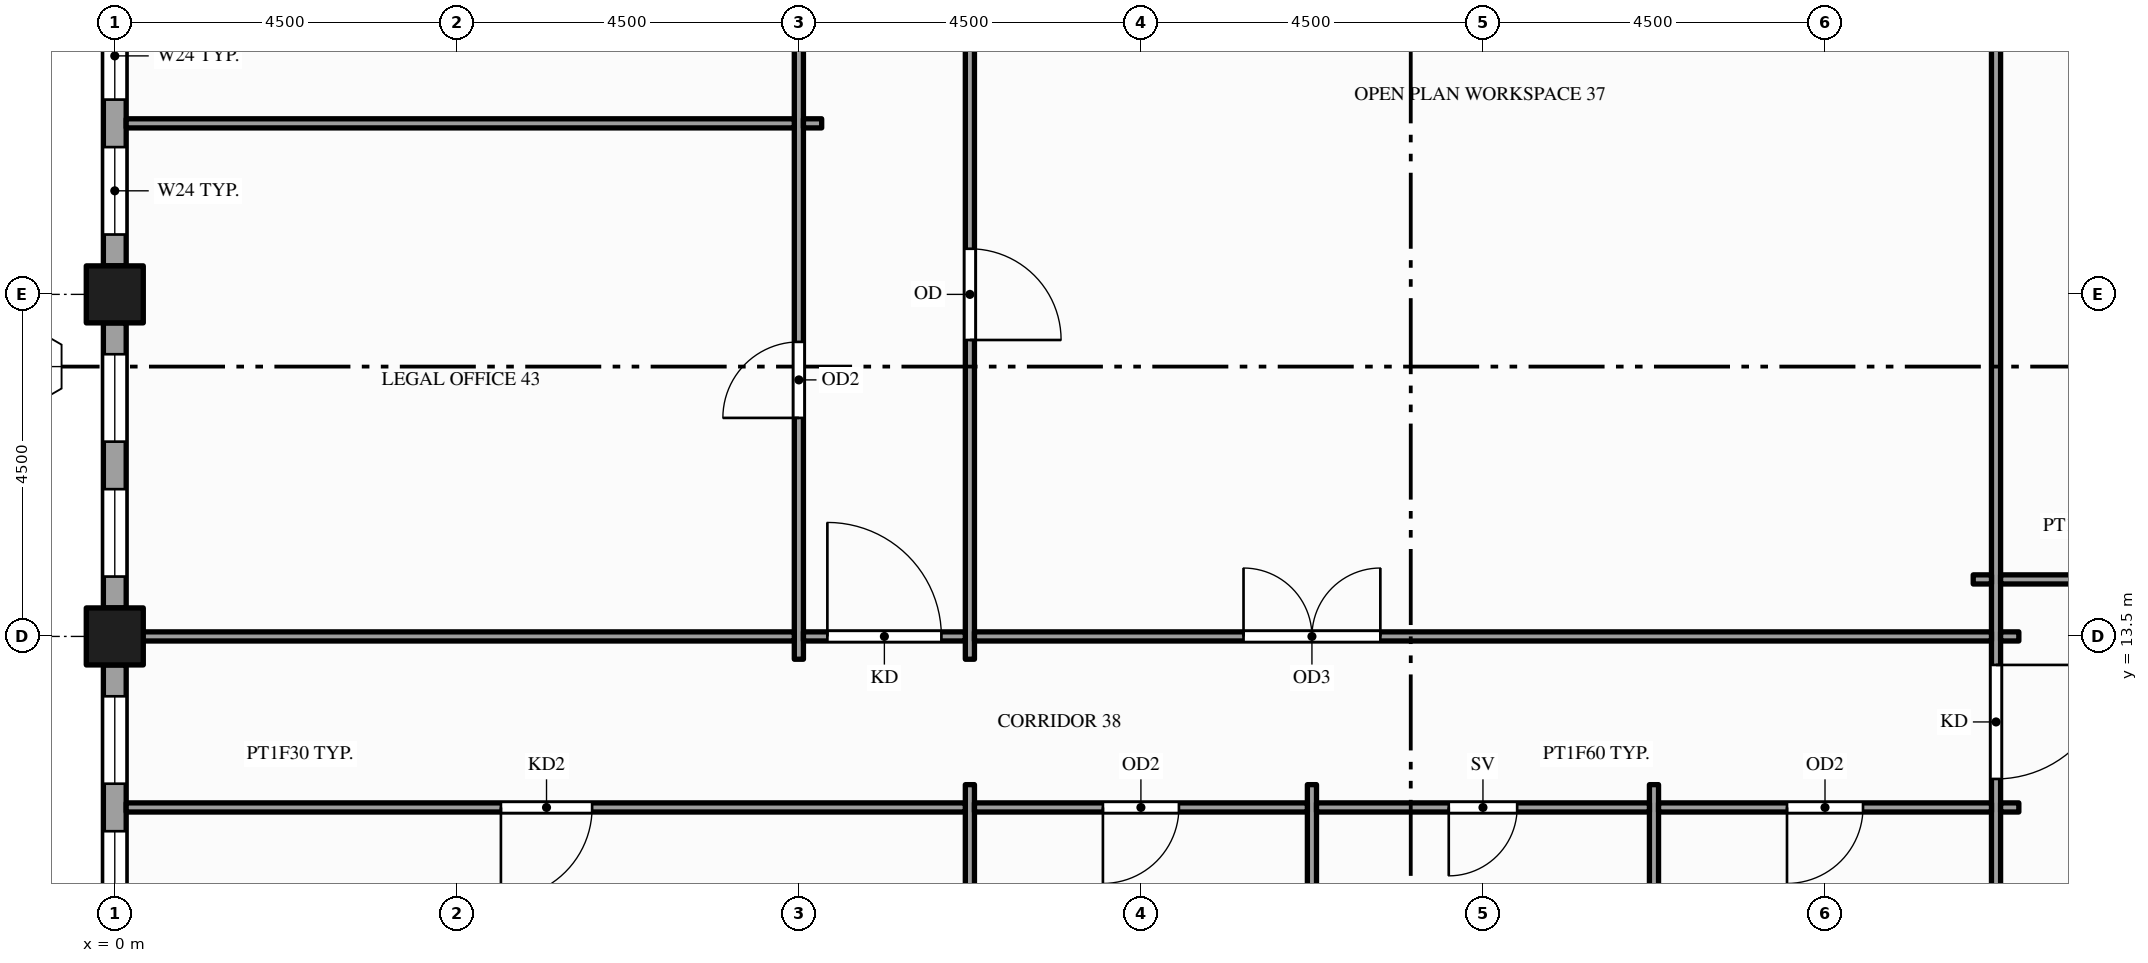
"""IFC4 building model, lengths in metres.
Left out: names, types, materials, properties, quantities, classifications, styles, units other than length and angle.
Written with IfcOpenShell. Run it as: python <this file> out.ifc"""

import sys

from ifc_helpers import new_model, si_unit, direction, frame, frame_2d, origin, origin_2d, place, context, subcontext, project, spatial, rectangle, hollow_rectangle, extrude, element, fill, save


model = new_model("IFC4")
c1 = context("Model", 3, precision=1e-05, world=origin(), true_north=direction((0.0, 1.0)))
c2 = subcontext(c1, "Body", "Model", "MODEL_VIEW")
j1 = project(units=[si_unit("LENGTHUNIT", "METRE"), si_unit("PLANEANGLEUNIT", "RADIAN")], contexts=[c1])
p1 = place(None, origin())
s1 = spatial("IfcSite", under=j1, at=p1, CompositionType="ELEMENT")
p2 = place(p1, origin())
s2 = spatial("IfcBuilding", under=s1, at=p2, CompositionType="ELEMENT")
p3 = place(p2, frame((0.0, 0.0, 239.0)))
s3 = spatial("IfcBuildingStorey", under=s2, at=p3, CompositionType="ELEMENT", Elevation=239.0)
for number, where, z_axis, x_axis in (
    (1, (0.0, 13.5, -0.15), (0.0, 0.0, 1.0), (1.0, 0.0, 0.0)),
    (2, (0.0, 18.0, -0.15), (0.0, 0.0, 1.0), (1.0, 0.0, 0.0)),
):
    element("IfcColumn", number, at=place(p3, frame(where, z_axis=z_axis, x_axis=x_axis)), inside=s3, PredefinedType="COLUMN", context=c2, shape_type="SweptSolid", body=[
        extrude(hollow_rectangle(XDim=0.75, YDim=0.75, WallThickness=0.036, at=origin_2d()), origin(), (0.0, 0.0, 1.0), 3.9),
    ])
p4 = place(p3, frame((0.0, 22.125, 0.0), z_axis=(0.0, 0.0, 1.0), x_axis=(0.0, -1.0, 0.0)))
e3 = element("IfcWall", 3, at=p4, inside=s3, PredefinedType="STANDARD", context=c2, shape_type="SweptSolid", body=[
    extrude(rectangle(XDim=3.75, YDim=0.3, at=frame_2d((1.875, 0.0))), origin(), (0.0, 0.0, 1.0), 3.057),
])
p5 = place(p4, frame((0.413, 0.0, 0.9)))
e4 = element("IfcOpeningElement", 4, at=p5, cuts=e3, PredefinedType="OPENING", context=c2, shape_type="SweptSolid", body=[
    extrude(rectangle(XDim=1.15, YDim=2.0, at=frame_2d((0.575, 1.0))), frame((0.0, 0.16, 0.0), z_axis=(0.0, -1.0, 0.0), x_axis=(1.0, 0.0, 0.0)), (0.0, 0.0, 1.0), 0.32),
])
p6 = place(p4, frame((2.188, 0.0, 0.9)))
e5 = element("IfcOpeningElement", 5, at=p6, cuts=e3, PredefinedType="OPENING", context=c2, shape_type="SweptSolid", body=[
    extrude(rectangle(XDim=1.15, YDim=2.0, at=frame_2d((0.575, 1.0))), frame((0.0, 0.16, 0.0), z_axis=(0.0, -1.0, 0.0), x_axis=(1.0, 0.0, 0.0)), (0.0, 0.0, 1.0), 0.32),
])
p7 = place(p3, frame((0.0, 17.625, 0.0), z_axis=(0.0, 0.0, 1.0), x_axis=(0.0, -1.0, 0.0)))
e6 = element("IfcWall", 6, at=p7, inside=s3, PredefinedType="STANDARD", context=c2, shape_type="SweptSolid", body=[
    extrude(rectangle(XDim=3.75, YDim=0.3, at=frame_2d((1.875, 0.0))), origin(), (0.0, 0.0, 1.0), 3.057),
])
p8 = place(p7, frame((0.413, 0.0, 0.9)))
e7 = element("IfcOpeningElement", 7, at=p8, cuts=e6, PredefinedType="OPENING", context=c2, shape_type="SweptSolid", body=[
    extrude(rectangle(XDim=1.15, YDim=2.0, at=frame_2d((0.575, 1.0))), frame((0.0, 0.16, 0.0), z_axis=(0.0, -1.0, 0.0), x_axis=(1.0, 0.0, 0.0)), (0.0, 0.0, 1.0), 0.32),
])
p9 = place(p7, frame((2.188, 0.0, 0.9)))
e8 = element("IfcOpeningElement", 8, at=p9, cuts=e6, PredefinedType="OPENING", context=c2, shape_type="SweptSolid", body=[
    extrude(rectangle(XDim=1.15, YDim=2.0, at=frame_2d((0.575, 1.0))), frame((0.0, 0.16, 0.0), z_axis=(0.0, -1.0, 0.0), x_axis=(1.0, 0.0, 0.0)), (0.0, 0.0, 1.0), 0.32),
])
p10 = place(p3, frame((0.0, 13.125, 0.0), z_axis=(0.0, 0.0, 1.0), x_axis=(0.0, -1.0, 0.0)))
e9 = element("IfcWall", 9, at=p10, inside=s3, PredefinedType="STANDARD", context=c2, shape_type="SweptSolid", body=[
    extrude(rectangle(XDim=3.75, YDim=0.3, at=frame_2d((1.875, 0.0))), origin(), (0.0, 0.0, 1.0), 3.057),
])
p11 = place(p10, frame((0.413, 0.0, 0.9)))
e10 = element("IfcOpeningElement", 10, at=p11, cuts=e9, PredefinedType="OPENING", context=c2, shape_type="SweptSolid", body=[
    extrude(rectangle(XDim=1.15, YDim=2.0, at=frame_2d((0.575, 1.0))), frame((0.0, 0.16, 0.0), z_axis=(0.0, -1.0, 0.0), x_axis=(1.0, 0.0, 0.0)), (0.0, 0.0, 1.0), 0.32),
])
p12 = place(p10, frame((2.188, 0.0, 0.9)))
e11 = element("IfcOpeningElement", 11, at=p12, cuts=e9, PredefinedType="OPENING", context=c2, shape_type="SweptSolid", body=[
    extrude(rectangle(XDim=1.15, YDim=2.0, at=frame_2d((0.575, 1.0))), frame((0.0, 0.16, 0.0), z_axis=(0.0, -1.0, 0.0), x_axis=(1.0, 0.0, 0.0)), (0.0, 0.0, 1.0), 0.32),
])
p13 = place(p3, frame((9.0, 13.2, 0.0), z_axis=(0.0, 0.0, 1.0), x_axis=(0.0, 1.0, 0.0)))
e12 = element("IfcWall", 12, at=p13, inside=s3, PredefinedType="PARTITIONING", context=c2, shape_type="SweptSolid", body=[
    extrude(rectangle(XDim=18.6, YDim=0.12, at=frame_2d((9.3, 0.0))), origin(), (0.0, 0.0, 1.0), 2.72),
])
p14 = place(p13, frame((3.175, 0.0, 0.0)))
e13 = element("IfcOpeningElement", 13, at=p14, cuts=e12, PredefinedType="OPENING", context=c2, shape_type="SweptSolid", body=[
    extrude(rectangle(XDim=1.0, YDim=2.1, at=frame_2d((0.5, 1.05))), frame((0.0, 0.07, 0.0), z_axis=(0.0, -1.0, 0.0), x_axis=(1.0, 0.0, 0.0)), (0.0, 0.0, 1.0), 0.14),
])
p15 = place(p13, frame((9.955, 0.0, 0.0)))
e14 = element("IfcOpeningElement", 14, at=p15, cuts=e12, PredefinedType="OPENING", context=c2, shape_type="SweptSolid", body=[
    extrude(rectangle(XDim=1.0, YDim=2.1, at=frame_2d((0.5, 1.05))), frame((0.0, 0.07, 0.0), z_axis=(0.0, -1.0, 0.0), x_axis=(1.0, 0.0, 0.0)), (0.0, 0.0, 1.0), 0.14),
])
p16 = place(p3, frame((11.25, 0.15, 0.0), z_axis=(0.0, 0.0, 1.0), x_axis=(0.0, 1.0, 0.0)))
e15 = element("IfcWall", 15, at=p16, inside=s3, PredefinedType="PARTITIONING", context=c2, shape_type="SweptSolid", body=[
    extrude(rectangle(XDim=11.4, YDim=0.12, at=frame_2d((5.7, 0.0))), origin(), (0.0, 0.0, 1.0), 2.77),
])
p17 = place(p3, frame((11.25, 13.2, 0.0), z_axis=(0.0, 0.0, 1.0), x_axis=(0.0, 1.0, 0.0)))
e16 = element("IfcWall", 16, at=p17, inside=s3, PredefinedType="PARTITIONING", context=c2, shape_type="SweptSolid", body=[
    extrude(rectangle(XDim=18.6, YDim=0.12, at=frame_2d((9.3, 0.0))), origin(), (0.0, 0.0, 1.0), 2.72),
])
p18 = place(p17, frame((4.2, 0.0, 0.0)))
e17 = element("IfcOpeningElement", 17, at=p18, cuts=e16, PredefinedType="OPENING", context=c2, shape_type="SweptSolid", body=[
    extrude(rectangle(XDim=1.2, YDim=2.1, at=frame_2d((0.6, 1.05))), frame((0.0, 0.07, 0.0), z_axis=(0.0, -1.0, 0.0), x_axis=(1.0, 0.0, 0.0)), (0.0, 0.0, 1.0), 0.14),
])
for number, where, z_axis, x_axis in (
    (18, (15.75, 0.15, 0.0), (0.0, 0.0, 1.0), (0.0, 1.0, 0.0)),
    (19, (20.25, 0.15, 0.0), (0.0, 0.0, 1.0), (0.0, 1.0, 0.0)),
):
    element("IfcWall", number, at=place(p3, frame(where, z_axis=z_axis, x_axis=x_axis)), inside=s3, PredefinedType="PARTITIONING", context=c2, shape_type="SweptSolid", body=[
        extrude(rectangle(XDim=11.4, YDim=0.12, at=frame_2d((5.7, 0.0))), origin(), (0.0, 0.0, 1.0), 2.77),
    ])
p19 = place(p3, frame((24.75, -1.35, 0.0), z_axis=(0.0, 0.0, 1.0), x_axis=(0.0, 1.0, 0.0)))
e20 = element("IfcWall", 20, at=p19, inside=s3, PredefinedType="PARTITIONING", context=c2, shape_type="SweptSolid", body=[
    extrude(rectangle(XDim=24.101, YDim=0.12, at=frame_2d((12.05, 0.0))), origin(), (0.0, 0.0, 1.0), 2.72),
])
p20 = place(p19, frame((12.975, 0.0, 0.0)))
e21 = element("IfcOpeningElement", 21, at=p20, cuts=e20, PredefinedType="OPENING", context=c2, shape_type="SweptSolid", body=[
    extrude(rectangle(XDim=1.5, YDim=2.1, at=frame_2d((0.75, 1.05))), frame((0.0, 0.07, 0.0), z_axis=(0.0, -1.0, 0.0), x_axis=(1.0, 0.0, 0.0)), (0.0, 0.0, 1.0), 0.14),
])
p21 = place(p3, frame((0.15, 11.25, 0.0), z_axis=(0.0, 0.0, 1.0), x_axis=(1.0, 0.0, 0.0)))
e22 = element("IfcWall", 22, at=p21, inside=s3, PredefinedType="PARTITIONING", context=c2, shape_type="SweptSolid", body=[
    extrude(rectangle(XDim=11.04, YDim=0.12, at=frame_2d((5.52, 0.0))), origin(), (0.0, 0.0, 1.0), 2.77),
])
p22 = place(p21, frame((4.93, 0.0, 0.0)))
e23 = element("IfcOpeningElement", 23, at=p22, cuts=e22, PredefinedType="OPENING", context=c2, shape_type="SweptSolid", body=[
    extrude(rectangle(XDim=1.2, YDim=2.1, at=frame_2d((0.6, 1.05))), frame((0.0, 0.07, 0.0), z_axis=(0.0, -1.0, 0.0), x_axis=(1.0, 0.0, 0.0)), (0.0, 0.0, 1.0), 0.14),
])
p23 = place(p3, frame((11.31, 11.25, 0.0), z_axis=(0.0, 0.0, 1.0), x_axis=(1.0, 0.0, 0.0)))
e24 = element("IfcWall", 24, at=p23, inside=s3, PredefinedType="PARTITIONING", context=c2, shape_type="SweptSolid", body=[
    extrude(rectangle(XDim=4.38, YDim=0.12, at=frame_2d((2.19, 0.0))), origin(), (0.0, 0.0, 1.0), 2.77),
])
p24 = place(p23, frame((1.69, 0.0, 0.0)))
e25 = element("IfcOpeningElement", 25, at=p24, cuts=e24, PredefinedType="OPENING", context=c2, shape_type="SweptSolid", body=[
    extrude(rectangle(XDim=1.0, YDim=2.1, at=frame_2d((0.5, 1.05))), frame((0.0, 0.07, 0.0), z_axis=(0.0, -1.0, 0.0), x_axis=(1.0, 0.0, 0.0)), (0.0, 0.0, 1.0), 0.14),
])
p25 = place(p3, frame((15.81, 11.25, 0.0), z_axis=(0.0, 0.0, 1.0), x_axis=(1.0, 0.0, 0.0)))
e26 = element("IfcWall", 26, at=p25, inside=s3, PredefinedType="PARTITIONING", context=c2, shape_type="SweptSolid", body=[
    extrude(rectangle(XDim=4.38, YDim=0.12, at=frame_2d((2.19, 0.0))), origin(), (0.0, 0.0, 1.0), 2.77),
])
p26 = place(p25, frame((1.74, 0.0, 0.0)))
e27 = element("IfcOpeningElement", 27, at=p26, cuts=e26, PredefinedType="OPENING", context=c2, shape_type="SweptSolid", body=[
    extrude(rectangle(XDim=0.9, YDim=2.1, at=frame_2d((0.45, 1.05))), frame((0.0, 0.07, 0.0), z_axis=(0.0, -1.0, 0.0), x_axis=(1.0, 0.0, 0.0)), (0.0, 0.0, 1.0), 0.14),
])
p27 = place(p3, frame((20.31, 11.25, 0.0), z_axis=(0.0, 0.0, 1.0), x_axis=(1.0, 0.0, 0.0)))
e28 = element("IfcWall", 28, at=p27, inside=s3, PredefinedType="PARTITIONING", context=c2, shape_type="SweptSolid", body=[
    extrude(rectangle(XDim=4.38, YDim=0.12, at=frame_2d((2.19, 0.0))), origin(), (0.0, 0.0, 1.0), 2.77),
])
p28 = place(p27, frame((1.69, 0.0, 0.0)))
e29 = element("IfcOpeningElement", 29, at=p28, cuts=e28, PredefinedType="OPENING", context=c2, shape_type="SweptSolid", body=[
    extrude(rectangle(XDim=1.0, YDim=2.1, at=frame_2d((0.5, 1.05))), frame((0.0, 0.07, 0.0), z_axis=(0.0, -1.0, 0.0), x_axis=(1.0, 0.0, 0.0)), (0.0, 0.0, 1.0), 0.14),
])
p29 = place(p3, frame((24.81, 11.25, 0.0), z_axis=(0.0, 0.0, 1.0), x_axis=(1.0, 0.0, 0.0)))
e30 = element("IfcWall", 30, at=p29, inside=s3, PredefinedType="PARTITIONING", context=c2, shape_type="SweptSolid", body=[
    extrude(rectangle(XDim=0.24, YDim=0.12, at=frame_2d((0.12, 0.0))), origin(), (0.0, 0.0, 1.0), 2.77),
])
p30 = place(p3, frame((0.15, 13.5, 0.0), z_axis=(0.0, 0.0, 1.0), x_axis=(1.0, 0.0, 0.0)))
e31 = element("IfcWall", 31, at=p30, inside=s3, PredefinedType="PARTITIONING", context=c2, shape_type="SweptSolid", body=[
    extrude(rectangle(XDim=8.79, YDim=0.12, at=frame_2d((4.395, 0.0))), origin(), (0.0, 0.0, 1.0), 2.77),
])
p31 = place(p3, frame((9.06, 13.5, 0.0), z_axis=(0.0, 0.0, 1.0), x_axis=(1.0, 0.0, 0.0)))
e32 = element("IfcWall", 32, at=p31, inside=s3, PredefinedType="PARTITIONING", context=c2, shape_type="SweptSolid", body=[
    extrude(rectangle(XDim=2.13, YDim=0.12, at=frame_2d((1.065, 0.0))), origin(), (0.0, 0.0, 1.0), 2.77),
])
p32 = place(p31, frame((0.315, 0.0, 0.0)))
e33 = element("IfcOpeningElement", 33, at=p32, cuts=e32, PredefinedType="OPENING", context=c2, shape_type="SweptSolid", body=[
    extrude(rectangle(XDim=1.5, YDim=2.1, at=frame_2d((0.75, 1.05))), frame((0.0, 0.07, 0.0), z_axis=(0.0, -1.0, 0.0), x_axis=(1.0, 0.0, 0.0)), (0.0, 0.0, 1.0), 0.14),
])
p33 = place(p3, frame((11.31, 13.5, 0.0), z_axis=(0.0, 0.0, 1.0), x_axis=(1.0, 0.0, 0.0)))
e34 = element("IfcWall", 34, at=p33, inside=s3, PredefinedType="PARTITIONING", context=c2, shape_type="SweptSolid", body=[
    extrude(rectangle(XDim=13.38, YDim=0.12, at=frame_2d((6.69, 0.0))), origin(), (0.0, 0.0, 1.0), 2.77),
])
p34 = place(p33, frame((3.54, 0.0, 0.0)))
e35 = element("IfcOpeningElement", 35, at=p34, cuts=e34, PredefinedType="OPENING", context=c2, shape_type="SweptSolid", body=[
    extrude(rectangle(XDim=1.8, YDim=2.1, at=frame_2d((0.9, 1.05))), frame((0.0, 0.07, 0.0), z_axis=(0.0, -1.0, 0.0), x_axis=(1.0, 0.0, 0.0)), (0.0, 0.0, 1.0), 0.14),
])
for number, where, z_axis, x_axis in (
    (36, (24.81, 13.5, 0.0), (0.0, 0.0, 1.0), (1.0, 0.0, 0.0)),
    (37, (24.45, 14.25, 0.0), (0.0, 0.0, 1.0), (1.0, 0.0, 0.0)),
):
    element("IfcWall", number, at=place(p3, frame(where, z_axis=z_axis, x_axis=x_axis)), inside=s3, PredefinedType="PARTITIONING", context=c2, shape_type="SweptSolid", body=[
        extrude(rectangle(XDim=0.24, YDim=0.12, at=frame_2d((0.12, 0.0))), origin(), (0.0, 0.0, 1.0), 2.77),
    ])
p35 = place(p3, frame((24.81, 14.25, 0.0), z_axis=(0.0, 0.0, 1.0), x_axis=(1.0, 0.0, 0.0)))
e38 = element("IfcWall", 38, at=p35, inside=s3, PredefinedType="PARTITIONING", context=c2, shape_type="SweptSolid", body=[
    extrude(rectangle(XDim=2.13, YDim=0.12, at=frame_2d((1.065, 0.0))), origin(), (0.0, 0.0, 1.0), 2.77),
])
p36 = place(p3, frame((0.15, 20.25, 0.0), z_axis=(0.0, 0.0, 1.0), x_axis=(1.0, 0.0, 0.0)))
e39 = element("IfcWall", 39, at=p36, inside=s3, PredefinedType="PARTITIONING", context=c2, shape_type="SweptSolid", body=[
    extrude(rectangle(XDim=8.79, YDim=0.12, at=frame_2d((4.395, 0.0))), origin(), (0.0, 0.0, 1.0), 2.77),
])
p37 = place(p3, frame((9.06, 20.25, 0.0), z_axis=(0.0, 0.0, 1.0), x_axis=(1.0, 0.0, 0.0)))
e40 = element("IfcWall", 40, at=p37, inside=s3, PredefinedType="PARTITIONING", context=c2, shape_type="SweptSolid", body=[
    extrude(rectangle(XDim=0.24, YDim=0.12, at=frame_2d((0.12, 0.0))), origin(), (0.0, 0.0, 1.0), 2.77),
])
p38 = place(p5, origin())
e41 = element("IfcWindow", 41, at=p38, inside=s3, PartitioningType="SINGLE_PANEL", PredefinedType="WINDOW", context=c2, shape_type="SweptSolid", body=[
    extrude(rectangle(XDim=1.15, YDim=2.0, at=frame_2d((0.575, 1.0))), frame((0.0, 0.03, 0.0), z_axis=(0.0, -1.0, 0.0), x_axis=(1.0, 0.0, 0.0)), (0.0, 0.0, 1.0), 0.06),
])
fill(e4, e41)
p39 = place(p6, origin())
e42 = element("IfcWindow", 42, at=p39, inside=s3, PartitioningType="SINGLE_PANEL", PredefinedType="WINDOW", context=c2, shape_type="SweptSolid", body=[
    extrude(rectangle(XDim=1.15, YDim=2.0, at=frame_2d((0.575, 1.0))), frame((0.0, 0.03, 0.0), z_axis=(0.0, -1.0, 0.0), x_axis=(1.0, 0.0, 0.0)), (0.0, 0.0, 1.0), 0.06),
])
fill(e5, e42)
p40 = place(p8, origin())
e43 = element("IfcWindow", 43, at=p40, inside=s3, PartitioningType="SINGLE_PANEL", PredefinedType="WINDOW", context=c2, shape_type="SweptSolid", body=[
    extrude(rectangle(XDim=1.15, YDim=2.0, at=frame_2d((0.575, 1.0))), frame((0.0, 0.03, 0.0), z_axis=(0.0, -1.0, 0.0), x_axis=(1.0, 0.0, 0.0)), (0.0, 0.0, 1.0), 0.06),
])
fill(e7, e43)
p41 = place(p9, origin())
e44 = element("IfcWindow", 44, at=p41, inside=s3, PartitioningType="SINGLE_PANEL", PredefinedType="WINDOW", context=c2, shape_type="SweptSolid", body=[
    extrude(rectangle(XDim=1.15, YDim=2.0, at=frame_2d((0.575, 1.0))), frame((0.0, 0.03, 0.0), z_axis=(0.0, -1.0, 0.0), x_axis=(1.0, 0.0, 0.0)), (0.0, 0.0, 1.0), 0.06),
])
fill(e8, e44)
p42 = place(p11, origin())
e45 = element("IfcWindow", 45, at=p42, inside=s3, PartitioningType="SINGLE_PANEL", PredefinedType="WINDOW", context=c2, shape_type="SweptSolid", body=[
    extrude(rectangle(XDim=1.15, YDim=2.0, at=frame_2d((0.575, 1.0))), frame((0.0, 0.03, 0.0), z_axis=(0.0, -1.0, 0.0), x_axis=(1.0, 0.0, 0.0)), (0.0, 0.0, 1.0), 0.06),
])
fill(e10, e45)
p43 = place(p12, origin())
e46 = element("IfcWindow", 46, at=p43, inside=s3, PartitioningType="SINGLE_PANEL", PredefinedType="WINDOW", context=c2, shape_type="SweptSolid", body=[
    extrude(rectangle(XDim=1.15, YDim=2.0, at=frame_2d((0.575, 1.0))), frame((0.0, 0.03, 0.0), z_axis=(0.0, -1.0, 0.0), x_axis=(1.0, 0.0, 0.0)), (0.0, 0.0, 1.0), 0.06),
])
fill(e11, e46)
p44 = place(p20, origin())
e47 = element("IfcDoor", 47, at=p44, inside=s3, OperationType="SINGLE_SWING_RIGHT", PredefinedType="DOOR", context=c2, shape_type="SweptSolid", body=[
    extrude(rectangle(XDim=1.5, YDim=2.1, at=frame_2d((0.75, 1.05))), frame((0.0, 0.025, 0.0), z_axis=(0.0, -1.0, 0.0), x_axis=(1.0, 0.0, 0.0)), (0.0, 0.0, 1.0), 0.05),
])
fill(e21, e47)
p45 = place(p22, origin())
e48 = element("IfcDoor", 48, at=p45, inside=s3, OperationType="SINGLE_SWING_LEFT", PredefinedType="DOOR", context=c2, shape_type="SweptSolid", body=[
    extrude(rectangle(XDim=1.2, YDim=2.1, at=frame_2d((0.6, 1.05))), frame((0.0, 0.025, 0.0), z_axis=(0.0, -1.0, 0.0), x_axis=(1.0, 0.0, 0.0)), (0.0, 0.0, 1.0), 0.05),
])
fill(e23, e48)
p46 = place(p24, origin())
e49 = element("IfcDoor", 49, at=p46, inside=s3, OperationType="SINGLE_SWING_LEFT", PredefinedType="DOOR", context=c2, shape_type="SweptSolid", body=[
    extrude(rectangle(XDim=1.0, YDim=2.1, at=frame_2d((0.5, 1.05))), frame((0.0, 0.025, 0.0), z_axis=(0.0, -1.0, 0.0), x_axis=(1.0, 0.0, 0.0)), (0.0, 0.0, 1.0), 0.05),
])
fill(e25, e49)
p47 = place(p26, origin())
e50 = element("IfcDoor", 50, at=p47, inside=s3, OperationType="SINGLE_SWING_LEFT", PredefinedType="DOOR", context=c2, shape_type="SweptSolid", body=[
    extrude(rectangle(XDim=0.9, YDim=2.1, at=frame_2d((0.45, 1.05))), frame((0.0, 0.025, 0.0), z_axis=(0.0, -1.0, 0.0), x_axis=(1.0, 0.0, 0.0)), (0.0, 0.0, 1.0), 0.05),
])
fill(e27, e50)
p48 = place(p28, origin())
e51 = element("IfcDoor", 51, at=p48, inside=s3, OperationType="SINGLE_SWING_LEFT", PredefinedType="DOOR", context=c2, shape_type="SweptSolid", body=[
    extrude(rectangle(XDim=1.0, YDim=2.1, at=frame_2d((0.5, 1.05))), frame((0.0, 0.025, 0.0), z_axis=(0.0, -1.0, 0.0), x_axis=(1.0, 0.0, 0.0)), (0.0, 0.0, 1.0), 0.05),
])
fill(e29, e51)
p49 = place(p34, origin())
e52 = element("IfcDoor", 52, at=p49, inside=s3, OperationType="DOUBLE_DOOR_SINGLE_SWING", PredefinedType="DOOR", context=c2, shape_type="SweptSolid", body=[
    extrude(rectangle(XDim=1.8, YDim=2.1, at=frame_2d((0.9, 1.05))), frame((0.0, 0.025, 0.0), z_axis=(0.0, -1.0, 0.0), x_axis=(1.0, 0.0, 0.0)), (0.0, 0.0, 1.0), 0.05),
])
fill(e35, e52)
p50 = place(p32, origin())
e53 = element("IfcDoor", 53, at=p50, inside=s3, OperationType="SINGLE_SWING_LEFT", PredefinedType="DOOR", context=c2, shape_type="SweptSolid", body=[
    extrude(rectangle(XDim=1.5, YDim=2.1, at=frame_2d((0.75, 1.05))), frame((0.0, 0.025, 0.0), z_axis=(0.0, -1.0, 0.0), x_axis=(1.0, 0.0, 0.0)), (0.0, 0.0, 1.0), 0.05),
])
fill(e33, e53)
p51 = place(p14, origin())
e54 = element("IfcDoor", 54, at=p51, inside=s3, OperationType="SINGLE_SWING_LEFT", PredefinedType="DOOR", context=c2, shape_type="SweptSolid", body=[
    extrude(rectangle(XDim=1.0, YDim=2.1, at=frame_2d((0.5, 1.05))), frame((0.0, 0.025, 0.0), z_axis=(0.0, -1.0, 0.0), x_axis=(1.0, 0.0, 0.0)), (0.0, 0.0, 1.0), 0.05),
])
fill(e13, e54)
p52 = place(p18, origin())
e55 = element("IfcDoor", 55, at=p52, inside=s3, OperationType="SINGLE_SWING_LEFT", PredefinedType="DOOR", context=c2, shape_type="SweptSolid", body=[
    extrude(rectangle(XDim=1.2, YDim=2.1, at=frame_2d((0.6, 1.05))), frame((0.0, 0.025, 0.0), z_axis=(0.0, -1.0, 0.0), x_axis=(1.0, 0.0, 0.0)), (0.0, 0.0, 1.0), 0.05),
])
fill(e17, e55)
save(model, sys.argv[1])
